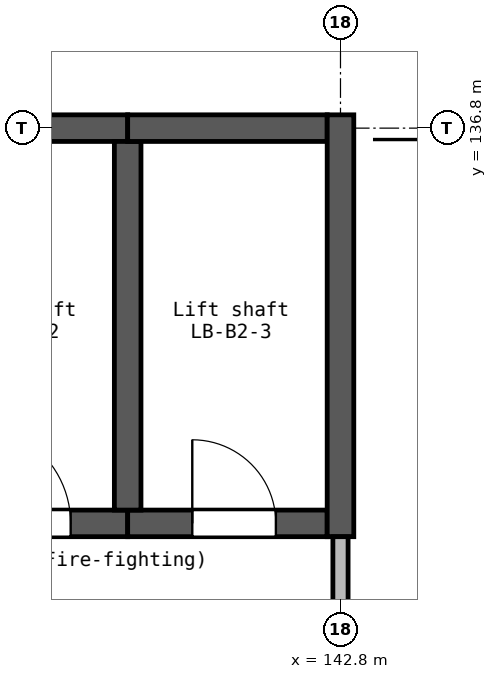
"""IFC4 building model, lengths in metres.
Left out: names, types, materials, properties, quantities, classifications, styles, units other than length and angle.
Written with IfcOpenShell. Run it as: python <this file> out.ifc"""

import sys

from ifc_helpers import new_model, si_unit, direction, frame, frame_2d, origin, place, context, subcontext, project, spatial, rectangle, extrude, element, fill, save


model = new_model("IFC4")
c1 = context("Model", 3, precision=1e-05, world=origin(), true_north=direction((0.0, 1.0)))
c2 = subcontext(c1, "Body", "Model", "MODEL_VIEW")
j1 = project(units=[si_unit("LENGTHUNIT", "METRE"), si_unit("PLANEANGLEUNIT", "RADIAN")], contexts=[c1])
p1 = place(None, origin())
s1 = spatial("IfcSite", under=j1, at=p1, CompositionType="ELEMENT")
p2 = place(p1, origin())
s2 = spatial("IfcBuilding", under=s1, at=p2, CompositionType="ELEMENT")
p3 = place(p2, frame((0.0, 0.0, 28.8)))
s3 = spatial("IfcBuildingStorey", under=s2, at=p3, CompositionType="ELEMENT", Elevation=28.8)
p4 = place(p3, frame((137.2, 131.6, 0.0), z_axis=(0.0, 0.0, 1.0), x_axis=(1.0, 0.0, 0.0)))
e1 = element("IfcWall", 1, at=p4, inside=s3, PredefinedType="SHEAR", context=c2, shape_type="SweptSolid", body=[
    extrude(rectangle(XDim=2.8, YDim=0.35, at=frame_2d((1.4, 0.0))), origin(), (0.0, 0.0, 1.0), 3.7),
])
p5 = place(p4, frame((0.75, 0.0, 0.0)))
e2 = element("IfcOpeningElement", 2, at=p5, cuts=e1, PredefinedType="OPENING", context=c2, shape_type="SweptSolid", body=[
    extrude(rectangle(XDim=1.3, YDim=2.1, at=frame_2d((0.65, 1.05))), frame((0.0, 0.185, 0.0), z_axis=(0.0, -1.0, 0.0), x_axis=(1.0, 0.0, 0.0)), (0.0, 0.0, 1.0), 0.37),
])
p6 = place(p3, frame((137.2, 136.8, 0.0), z_axis=(0.0, 0.0, 1.0), x_axis=(1.0, 0.0, 0.0)))
e3 = element("IfcWall", 3, at=p6, inside=s3, PredefinedType="SHEAR", context=c2, shape_type="SweptSolid", body=[
    extrude(rectangle(XDim=2.8, YDim=0.35, at=frame_2d((1.4, 0.0))), origin(), (0.0, 0.0, 1.0), 3.7),
])
p7 = place(p3, frame((140.0, 131.6, 0.0), z_axis=(0.0, 0.0, 1.0), x_axis=(1.0, 0.0, 0.0)))
e4 = element("IfcWall", 4, at=p7, inside=s3, PredefinedType="SHEAR", context=c2, shape_type="SweptSolid", body=[
    extrude(rectangle(XDim=2.625, YDim=0.35, at=frame_2d((1.312, 0.0))), origin(), (0.0, 0.0, 1.0), 3.7),
])
p8 = place(p7, frame((0.85, 0.0, 0.0)))
e5 = element("IfcOpeningElement", 5, at=p8, cuts=e4, PredefinedType="OPENING", context=c2, shape_type="SweptSolid", body=[
    extrude(rectangle(XDim=1.1, YDim=2.1, at=frame_2d((0.55, 1.05))), frame((0.0, 0.185, 0.0), z_axis=(0.0, -1.0, 0.0), x_axis=(1.0, 0.0, 0.0)), (0.0, 0.0, 1.0), 0.37),
])
p9 = place(p3, frame((140.0, 131.775, 0.0), z_axis=(0.0, 0.0, 1.0), x_axis=(0.0, 1.0, 0.0)))
e6 = element("IfcWall", 6, at=p9, inside=s3, PredefinedType="SHEAR", context=c2, shape_type="SweptSolid", body=[
    extrude(rectangle(XDim=4.85, YDim=0.35, at=frame_2d((2.425, 0.0))), origin(), (0.0, 0.0, 1.0), 3.7),
])
p10 = place(p3, frame((140.0, 136.8, 0.0), z_axis=(0.0, 0.0, 1.0), x_axis=(1.0, 0.0, 0.0)))
e7 = element("IfcWall", 7, at=p10, inside=s3, PredefinedType="SHEAR", context=c2, shape_type="SweptSolid", body=[
    extrude(rectangle(XDim=2.625, YDim=0.35, at=frame_2d((1.312, 0.0))), origin(), (0.0, 0.0, 1.0), 3.7),
])
p11 = place(p3, frame((142.8, 131.425, 0.0), z_axis=(0.0, 0.0, 1.0), x_axis=(0.0, 1.0, 0.0)))
e8 = element("IfcWall", 8, at=p11, inside=s3, PredefinedType="SHEAR", context=c2, shape_type="SweptSolid", body=[
    extrude(rectangle(XDim=5.55, YDim=0.35, at=frame_2d((2.775, 0.0))), origin(), (0.0, 0.0, 1.0), 3.7),
])
p12 = place(p3, frame((142.8, 129.1, 0.0), z_axis=(0.0, 0.0, 1.0), x_axis=(0.0, 1.0, 0.0)))
e9 = element("IfcWall", 9, at=p12, inside=s3, PredefinedType="SOLIDWALL", context=c2, shape_type="SweptSolid", body=[
    extrude(rectangle(XDim=2.325, YDim=0.2, at=frame_2d((1.163, 0.0))), origin(), (0.0, 0.0, 1.0), 3.6),
])
p13 = place(p5, origin())
e10 = element("IfcDoor", 10, at=p13, inside=s3, OperationType="DOUBLE_DOOR_SLIDING", PredefinedType="DOOR", context=c2, shape_type="SweptSolid", body=[
    extrude(rectangle(XDim=1.3, YDim=2.1, at=frame_2d((0.65, 1.05))), frame((0.0, 0.025, 0.0), z_axis=(0.0, -1.0, 0.0), x_axis=(1.0, 0.0, 0.0)), (0.0, 0.0, 1.0), 0.05),
])
fill(e2, e10)
p14 = place(p8, origin())
e11 = element("IfcDoor", 11, at=p14, inside=s3, OperationType="DOUBLE_DOOR_SLIDING", PredefinedType="DOOR", context=c2, shape_type="SweptSolid", body=[
    extrude(rectangle(XDim=1.1, YDim=2.1, at=frame_2d((0.55, 1.05))), frame((0.0, 0.025, 0.0), z_axis=(0.0, -1.0, 0.0), x_axis=(1.0, 0.0, 0.0)), (0.0, 0.0, 1.0), 0.05),
])
fill(e5, e11)
save(model, sys.argv[1])
